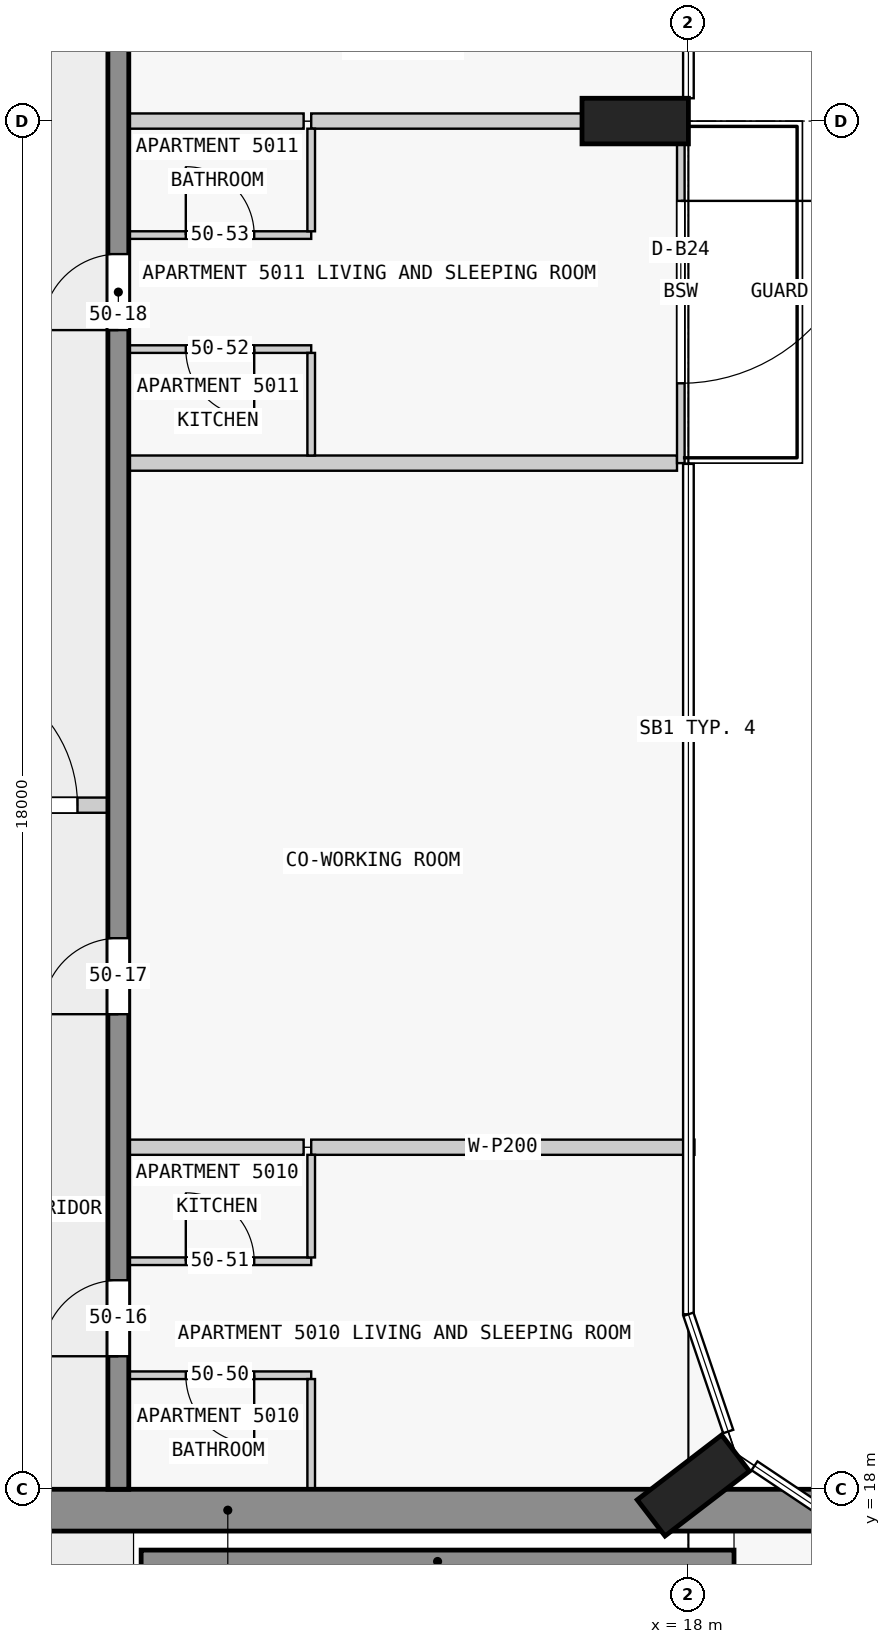
"""IFC4 building model, lengths in metres.
Left out: names, types, materials, properties, quantities, classifications, styles, units other than length and angle.
Written with IfcOpenShell. Run it as: python <this file> out.ifc"""

import sys

from ifc_helpers import new_model, si_unit, direction, frame, frame_2d, origin, origin_2d, place, context, subcontext, project, spatial, rectangle, extrude, element, fill, save


model = new_model("IFC4")
c1 = context("Model", 3, precision=1e-05, world=origin(), true_north=direction((0.0, 1.0)))
c2 = subcontext(c1, "Body", "Model", "MODEL_VIEW")
j1 = project(units=[si_unit("LENGTHUNIT", "METRE"), si_unit("PLANEANGLEUNIT", "RADIAN")], contexts=[c1])
p1 = place(None, origin())
s1 = spatial("IfcSite", under=j1, at=p1, CompositionType="ELEMENT")
p2 = place(p1, origin())
s2 = spatial("IfcBuilding", under=s1, at=p2, CompositionType="ELEMENT")
p3 = place(p2, frame((0.0, 0.0, 194.4)))
s3 = spatial("IfcBuildingStorey", under=s2, at=p3, CompositionType="ELEMENT", Elevation=194.4)
for number, where, z_axis, x_axis in (
    (1, (18.065, 18.05, 0.0), (0.0, 0.0, 1.0), (-0.609, 0.793, 0.0)),
    (2, (17.3, 36.0, 0.0), (0.0, 0.0, 1.0), (0.0, 1.0, 0.0)),
):
    element("IfcColumn", number, at=place(p3, frame(where, z_axis=z_axis, x_axis=x_axis)), inside=s3, PredefinedType="COLUMN", context=c2, shape_type="SweptSolid", body=[
        extrude(rectangle(XDim=0.6, YDim=1.4, at=origin_2d()), origin(), (0.0, 0.0, 1.0), 3.5),
    ])
p4 = place(p3, frame((1.38, 17.725, 0.0), z_axis=(0.0, 0.0, 1.0), x_axis=(1.0, 0.0, 0.0)))
e3 = element("IfcWall", 3, at=p4, inside=s3, PredefinedType="SHEAR", context=c2, shape_type="SweptSolid", body=[
    extrude(rectangle(XDim=21.12, YDim=0.55, at=frame_2d((10.56, 0.0))), origin(), (0.0, 0.0, 1.0), 3.25),
])
p5 = place(p4, frame((6.35, 0.0, 0.0)))
e4 = element("IfcOpeningElement", 4, at=p5, cuts=e3, PredefinedType="OPENING", context=c2, shape_type="SweptSolid", body=[
    extrude(rectangle(XDim=1.8, YDim=2.1, at=frame_2d((0.9, 1.05))), frame((0.0, 0.285, 0.0), z_axis=(0.0, -1.0, 0.0), x_axis=(1.0, 0.0, 0.0)), (0.0, 0.0, 1.0), 0.57),
])
p6 = place(p3, frame((10.8, 17.05, 0.0), z_axis=(0.0, 0.0, 1.0), x_axis=(1.0, 0.0, 0.0)))
e5 = element("IfcWall", 5, at=p6, inside=s3, PredefinedType="SHEAR", context=c2, shape_type="SweptSolid", body=[
    extrude(rectangle(XDim=7.8, YDim=0.3, at=frame_2d((3.9, 0.0))), origin(), (0.0, 0.0, 1.0), 3.25),
])
p7 = place(p3, frame((10.5, 18.0, 0.0), z_axis=(0.0, 0.0, 1.0), x_axis=(0.0, 1.0, 0.0)))
e6 = element("IfcWall", 6, at=p7, inside=s3, PredefinedType="SHEAR", context=c2, shape_type="SweptSolid", body=[
    extrude(rectangle(XDim=27.0, YDim=0.275, at=frame_2d((13.5, 0.0))), origin(), (0.0, 0.0, 1.0), 3.25),
])
p8 = place(p7, frame((1.75, 0.0, 0.0)))
e7 = element("IfcOpeningElement", 7, at=p8, cuts=e6, PredefinedType="OPENING", context=c2, shape_type="SweptSolid", body=[
    extrude(rectangle(XDim=1.0, YDim=2.1, at=frame_2d((0.5, 1.05))), frame((0.0, 0.147, 0.0), z_axis=(0.0, -1.0, 0.0), x_axis=(1.0, 0.0, 0.0)), (0.0, 0.0, 1.0), 0.295),
])
p9 = place(p7, frame((6.25, 0.0, 0.0)))
e8 = element("IfcOpeningElement", 8, at=p9, cuts=e6, PredefinedType="OPENING", context=c2, shape_type="SweptSolid", body=[
    extrude(rectangle(XDim=1.0, YDim=2.1, at=frame_2d((0.5, 1.05))), frame((0.0, 0.147, 0.0), z_axis=(0.0, -1.0, 0.0), x_axis=(1.0, 0.0, 0.0)), (0.0, 0.0, 1.0), 0.295),
])
p10 = place(p7, frame((15.25, 0.0, 0.0)))
e9 = element("IfcOpeningElement", 9, at=p10, cuts=e6, PredefinedType="OPENING", context=c2, shape_type="SweptSolid", body=[
    extrude(rectangle(XDim=1.0, YDim=2.1, at=frame_2d((0.5, 1.05))), frame((0.0, 0.147, 0.0), z_axis=(0.0, -1.0, 0.0), x_axis=(1.0, 0.0, 0.0)), (0.0, 0.0, 1.0), 0.295),
])
p11 = place(p7, frame((19.75, 0.0, 0.0)))
e10 = element("IfcOpeningElement", 10, at=p11, cuts=e6, PredefinedType="OPENING", context=c2, shape_type="SweptSolid", body=[
    extrude(rectangle(XDim=1.0, YDim=2.1, at=frame_2d((0.5, 1.05))), frame((0.0, 0.147, 0.0), z_axis=(0.0, -1.0, 0.0), x_axis=(1.0, 0.0, 0.0)), (0.0, 0.0, 1.0), 0.295),
])
p12 = place(p7, frame((23.25, 0.0, 0.0)))
e11 = element("IfcOpeningElement", 11, at=p12, cuts=e6, PredefinedType="OPENING", context=c2, shape_type="SweptSolid", body=[
    extrude(rectangle(XDim=0.9, YDim=2.1, at=frame_2d((0.45, 1.05))), frame((0.0, 0.147, 0.0), z_axis=(0.0, -1.0, 0.0), x_axis=(1.0, 0.0, 0.0)), (0.0, 0.0, 1.0), 0.295),
])
p13 = place(p7, frame((25.45, 0.0, 0.0)))
e12 = element("IfcOpeningElement", 12, at=p13, cuts=e6, PredefinedType="OPENING", context=c2, shape_type="SweptSolid", body=[
    extrude(rectangle(XDim=1.0, YDim=2.1, at=frame_2d((0.5, 1.05))), frame((0.0, 0.147, 0.0), z_axis=(0.0, -1.0, 0.0), x_axis=(1.0, 0.0, 0.0)), (0.0, 0.0, 1.0), 0.295),
])
p14 = place(p3, frame((17.9, 36.0, 0.0), z_axis=(0.0, 0.0, 1.0), x_axis=(0.0, -1.0, 0.0)))
e13 = element("IfcWall", 13, at=p14, inside=s3, PredefinedType="STANDARD", context=c2, shape_type="SweptSolid", body=[
    extrude(rectangle(XDim=4.5, YDim=0.1, at=frame_2d((2.25, 0.0))), origin(), (0.0, 0.0, 1.0), 3.25),
])
p15 = place(p14, frame((1.05, 0.0, 0.0)))
e14 = element("IfcOpeningElement", 14, at=p15, cuts=e13, PredefinedType="OPENING", context=c2, shape_type="SweptSolid", body=[
    extrude(rectangle(XDim=2.4, YDim=2.4, at=frame_2d((1.2, 1.2))), frame((0.0, 0.06, 0.0), z_axis=(0.0, -1.0, 0.0), x_axis=(1.0, 0.0, 0.0)), (0.0, 0.0, 1.0), 0.12),
])
p16 = place(p3, frame((13.038, 19.5, 0.0), z_axis=(0.0, 0.0, 1.0), x_axis=(-1.0, 0.0, 0.0)))
e15 = element("IfcWall", 15, at=p16, inside=s3, PredefinedType="PARTITIONING", context=c2, shape_type="SweptSolid", body=[
    extrude(rectangle(XDim=2.4, YDim=0.1, at=frame_2d((1.2, 0.0))), origin(), (0.0, 0.0, 1.0), 3.25),
])
p17 = place(p16, frame((0.75, 0.0, 0.0)))
e16 = element("IfcOpeningElement", 16, at=p17, cuts=e15, PredefinedType="OPENING", context=c2, shape_type="SweptSolid", body=[
    extrude(rectangle(XDim=0.9, YDim=2.1, at=frame_2d((0.45, 1.05))), frame((0.0, 0.06, 0.0), z_axis=(0.0, -1.0, 0.0), x_axis=(1.0, 0.0, 0.0)), (0.0, 0.0, 1.0), 0.12),
])
p18 = place(p3, frame((10.637, 21.0, 0.0), z_axis=(0.0, 0.0, 1.0), x_axis=(1.0, 0.0, 0.0)))
e17 = element("IfcWall", 17, at=p18, inside=s3, PredefinedType="PARTITIONING", context=c2, shape_type="SweptSolid", body=[
    extrude(rectangle(XDim=2.4, YDim=0.1, at=frame_2d((1.2, 0.0))), origin(), (0.0, 0.0, 1.0), 3.25),
])
p19 = place(p18, frame((0.75, 0.0, 0.0)))
e18 = element("IfcOpeningElement", 18, at=p19, cuts=e17, PredefinedType="OPENING", context=c2, shape_type="SweptSolid", body=[
    extrude(rectangle(XDim=0.9, YDim=2.1, at=frame_2d((0.45, 1.05))), frame((0.0, 0.06, 0.0), z_axis=(0.0, -1.0, 0.0), x_axis=(1.0, 0.0, 0.0)), (0.0, 0.0, 1.0), 0.12),
])
p20 = place(p3, frame((12.938, 22.5, 0.0), z_axis=(0.0, 0.0, 1.0), x_axis=(-1.0, 0.0, 0.0)))
e19 = element("IfcWall", 19, at=p20, inside=s3, PredefinedType="PARTITIONING", context=c2, shape_type="SweptSolid", body=[
    extrude(rectangle(XDim=2.3, YDim=0.2, at=frame_2d((1.15, 0.0))), origin(), (0.0, 0.0, 1.0), 3.25),
])
p21 = place(p3, frame((13.038, 22.5, 0.0), z_axis=(0.0, 0.0, 1.0), x_axis=(1.0, 0.0, 0.0)))
e20 = element("IfcWall", 20, at=p21, inside=s3, PredefinedType="PARTITIONING", context=c2, shape_type="SweptSolid", body=[
    extrude(rectangle(XDim=5.042, YDim=0.2, at=frame_2d((2.521, 0.0))), origin(), (0.0, 0.0, 1.0), 3.25),
])
p22 = place(p3, frame((17.85, 31.5, 0.0), z_axis=(0.0, 0.0, 1.0), x_axis=(-1.0, 0.0, 0.0)))
e21 = element("IfcWall", 21, at=p22, inside=s3, PredefinedType="PARTITIONING", context=c2, shape_type="SweptSolid", body=[
    extrude(rectangle(XDim=7.213, YDim=0.2, at=frame_2d((3.606, 0.0))), origin(), (0.0, 0.0, 1.0), 3.25),
])
p23 = place(p3, frame((13.038, 33.0, 0.0), z_axis=(0.0, 0.0, 1.0), x_axis=(-1.0, 0.0, 0.0)))
e22 = element("IfcWall", 22, at=p23, inside=s3, PredefinedType="PARTITIONING", context=c2, shape_type="SweptSolid", body=[
    extrude(rectangle(XDim=2.4, YDim=0.1, at=frame_2d((1.2, 0.0))), origin(), (0.0, 0.0, 1.0), 3.25),
])
p24 = place(p23, frame((0.75, 0.0, 0.0)))
e23 = element("IfcOpeningElement", 23, at=p24, cuts=e22, PredefinedType="OPENING", context=c2, shape_type="SweptSolid", body=[
    extrude(rectangle(XDim=0.9, YDim=2.1, at=frame_2d((0.45, 1.05))), frame((0.0, 0.06, 0.0), z_axis=(0.0, -1.0, 0.0), x_axis=(1.0, 0.0, 0.0)), (0.0, 0.0, 1.0), 0.12),
])
p25 = place(p3, frame((10.637, 34.5, 0.0), z_axis=(0.0, 0.0, 1.0), x_axis=(1.0, 0.0, 0.0)))
e24 = element("IfcWall", 24, at=p25, inside=s3, PredefinedType="PARTITIONING", context=c2, shape_type="SweptSolid", body=[
    extrude(rectangle(XDim=2.4, YDim=0.1, at=frame_2d((1.2, 0.0))), origin(), (0.0, 0.0, 1.0), 3.25),
])
p26 = place(p25, frame((0.75, 0.0, 0.0)))
e25 = element("IfcOpeningElement", 25, at=p26, cuts=e24, PredefinedType="OPENING", context=c2, shape_type="SweptSolid", body=[
    extrude(rectangle(XDim=0.9, YDim=2.1, at=frame_2d((0.45, 1.05))), frame((0.0, 0.06, 0.0), z_axis=(0.0, -1.0, 0.0), x_axis=(1.0, 0.0, 0.0)), (0.0, 0.0, 1.0), 0.12),
])
p27 = place(p3, frame((12.938, 36.0, 0.0), z_axis=(0.0, 0.0, 1.0), x_axis=(-1.0, 0.0, 0.0)))
e26 = element("IfcWall", 26, at=p27, inside=s3, PredefinedType="PARTITIONING", context=c2, shape_type="SweptSolid", body=[
    extrude(rectangle(XDim=2.3, YDim=0.2, at=frame_2d((1.15, 0.0))), origin(), (0.0, 0.0, 1.0), 3.25),
])
p28 = place(p3, frame((13.038, 36.0, 0.0), z_axis=(0.0, 0.0, 1.0), x_axis=(1.0, 0.0, 0.0)))
e27 = element("IfcWall", 27, at=p28, inside=s3, PredefinedType="PARTITIONING", context=c2, shape_type="SweptSolid", body=[
    extrude(rectangle(XDim=3.562, YDim=0.2, at=frame_2d((1.781, 0.0))), origin(), (0.0, 0.0, 1.0), 3.25),
])
p29 = place(p3, frame((13.038, 18.0, 0.0), z_axis=(0.0, 0.0, 1.0), x_axis=(0.0, 1.0, 0.0)))
e28 = element("IfcWall", 28, at=p29, inside=s3, PredefinedType="PARTITIONING", context=c2, shape_type="SweptSolid", body=[
    extrude(rectangle(XDim=1.45, YDim=0.1, at=frame_2d((0.725, 0.0))), origin(), (0.0, 0.0, 1.0), 3.25),
])
for number, where, z_axis, x_axis in (
    (29, (13.038, 21.05, 0.0), (0.0, 0.0, 1.0), (0.0, 1.0, 0.0)),
    (30, (13.038, 31.6, 0.0), (0.0, 0.0, 1.0), (0.0, 1.0, 0.0)),
    (31, (13.038, 34.55, 0.0), (0.0, 0.0, 1.0), (0.0, 1.0, 0.0)),
):
    element("IfcWall", number, at=place(p3, frame(where, z_axis=z_axis, x_axis=x_axis)), inside=s3, PredefinedType="PARTITIONING", context=c2, shape_type="SweptSolid", body=[
        extrude(rectangle(XDim=1.35, YDim=0.1, at=frame_2d((0.675, 0.0))), origin(), (0.0, 0.0, 1.0), 3.25),
    ])
p30 = place(p3, frame((7.462, 27.0, 0.0), z_axis=(0.0, 0.0, 1.0), x_axis=(1.0, 0.0, 0.0)))
e32 = element("IfcWall", 32, at=p30, inside=s3, PredefinedType="PARTITIONING", context=c2, shape_type="SweptSolid", body=[
    extrude(rectangle(XDim=3.175, YDim=0.2, at=frame_2d((1.587, 0.0))), origin(), (0.0, 0.0, 1.0), 3.25),
])
p31 = place(p30, frame((0.7, 0.0, 0.0)))
e33 = element("IfcOpeningElement", 33, at=p31, cuts=e32, PredefinedType="OPENING", context=c2, shape_type="SweptSolid", body=[
    extrude(rectangle(XDim=1.8, YDim=2.1, at=frame_2d((0.9, 1.05))), frame((0.0, 0.11, 0.0), z_axis=(0.0, -1.0, 0.0), x_axis=(1.0, 0.0, 0.0)), (0.0, 0.0, 1.0), 0.22),
])
p32 = place(p15, origin())
e34 = element("IfcDoor", 34, at=p32, inside=s3, OperationType="SINGLE_SWING_LEFT", PredefinedType="DOOR", context=c2, shape_type="SweptSolid", body=[
    extrude(rectangle(XDim=2.4, YDim=2.4, at=frame_2d((1.2, 1.2))), frame((0.0, 0.025, 0.0), z_axis=(0.0, -1.0, 0.0), x_axis=(1.0, 0.0, 0.0)), (0.0, 0.0, 1.0), 0.05),
])
fill(e14, e34)
p33 = place(p8, origin())
e35 = element("IfcDoor", 35, at=p33, inside=s3, OperationType="SINGLE_SWING_LEFT", PredefinedType="DOOR", context=c2, shape_type="SweptSolid", body=[
    extrude(rectangle(XDim=1.0, YDim=2.1, at=frame_2d((0.5, 1.05))), frame((0.0, 0.025, 0.0), z_axis=(0.0, -1.0, 0.0), x_axis=(1.0, 0.0, 0.0)), (0.0, 0.0, 1.0), 0.05),
])
fill(e7, e35)
p34 = place(p9, origin())
e36 = element("IfcDoor", 36, at=p34, inside=s3, OperationType="SINGLE_SWING_LEFT", PredefinedType="DOOR", context=c2, shape_type="SweptSolid", body=[
    extrude(rectangle(XDim=1.0, YDim=2.1, at=frame_2d((0.5, 1.05))), frame((0.0, 0.025, 0.0), z_axis=(0.0, -1.0, 0.0), x_axis=(1.0, 0.0, 0.0)), (0.0, 0.0, 1.0), 0.05),
])
fill(e8, e36)
p35 = place(p10, origin())
e37 = element("IfcDoor", 37, at=p35, inside=s3, OperationType="SINGLE_SWING_RIGHT", PredefinedType="DOOR", context=c2, shape_type="SweptSolid", body=[
    extrude(rectangle(XDim=1.0, YDim=2.1, at=frame_2d((0.5, 1.05))), frame((0.0, 0.025, 0.0), z_axis=(0.0, -1.0, 0.0), x_axis=(1.0, 0.0, 0.0)), (0.0, 0.0, 1.0), 0.05),
])
fill(e9, e37)
p36 = place(p31, origin())
e38 = element("IfcDoor", 38, at=p36, inside=s3, OperationType="SINGLE_SWING_RIGHT", PredefinedType="DOOR", context=c2, shape_type="SweptSolid", body=[
    extrude(rectangle(XDim=1.8, YDim=2.1, at=frame_2d((0.9, 1.05))), frame((0.0, 0.025, 0.0), z_axis=(0.0, -1.0, 0.0), x_axis=(1.0, 0.0, 0.0)), (0.0, 0.0, 1.0), 0.05),
])
fill(e33, e38)
p37 = place(p17, origin())
e39 = element("IfcDoor", 39, at=p37, inside=s3, OperationType="SINGLE_SWING_LEFT", PredefinedType="DOOR", context=c2, shape_type="SweptSolid", body=[
    extrude(rectangle(XDim=0.9, YDim=2.1, at=frame_2d((0.45, 1.05))), frame((0.0, 0.025, 0.0), z_axis=(0.0, -1.0, 0.0), x_axis=(1.0, 0.0, 0.0)), (0.0, 0.0, 1.0), 0.05),
])
fill(e16, e39)
p38 = place(p19, origin())
e40 = element("IfcDoor", 40, at=p38, inside=s3, OperationType="SINGLE_SWING_LEFT", PredefinedType="DOOR", context=c2, shape_type="SweptSolid", body=[
    extrude(rectangle(XDim=0.9, YDim=2.1, at=frame_2d((0.45, 1.05))), frame((0.0, 0.025, 0.0), z_axis=(0.0, -1.0, 0.0), x_axis=(1.0, 0.0, 0.0)), (0.0, 0.0, 1.0), 0.05),
])
fill(e18, e40)
p39 = place(p24, origin())
e41 = element("IfcDoor", 41, at=p39, inside=s3, OperationType="SINGLE_SWING_LEFT", PredefinedType="DOOR", context=c2, shape_type="SweptSolid", body=[
    extrude(rectangle(XDim=0.9, YDim=2.1, at=frame_2d((0.45, 1.05))), frame((0.0, 0.025, 0.0), z_axis=(0.0, -1.0, 0.0), x_axis=(1.0, 0.0, 0.0)), (0.0, 0.0, 1.0), 0.05),
])
fill(e23, e41)
p40 = place(p26, origin())
e42 = element("IfcDoor", 42, at=p40, inside=s3, OperationType="SINGLE_SWING_LEFT", PredefinedType="DOOR", context=c2, shape_type="SweptSolid", body=[
    extrude(rectangle(XDim=0.9, YDim=2.1, at=frame_2d((0.45, 1.05))), frame((0.0, 0.025, 0.0), z_axis=(0.0, -1.0, 0.0), x_axis=(1.0, 0.0, 0.0)), (0.0, 0.0, 1.0), 0.05),
])
fill(e25, e42)
save(model, sys.argv[1])
